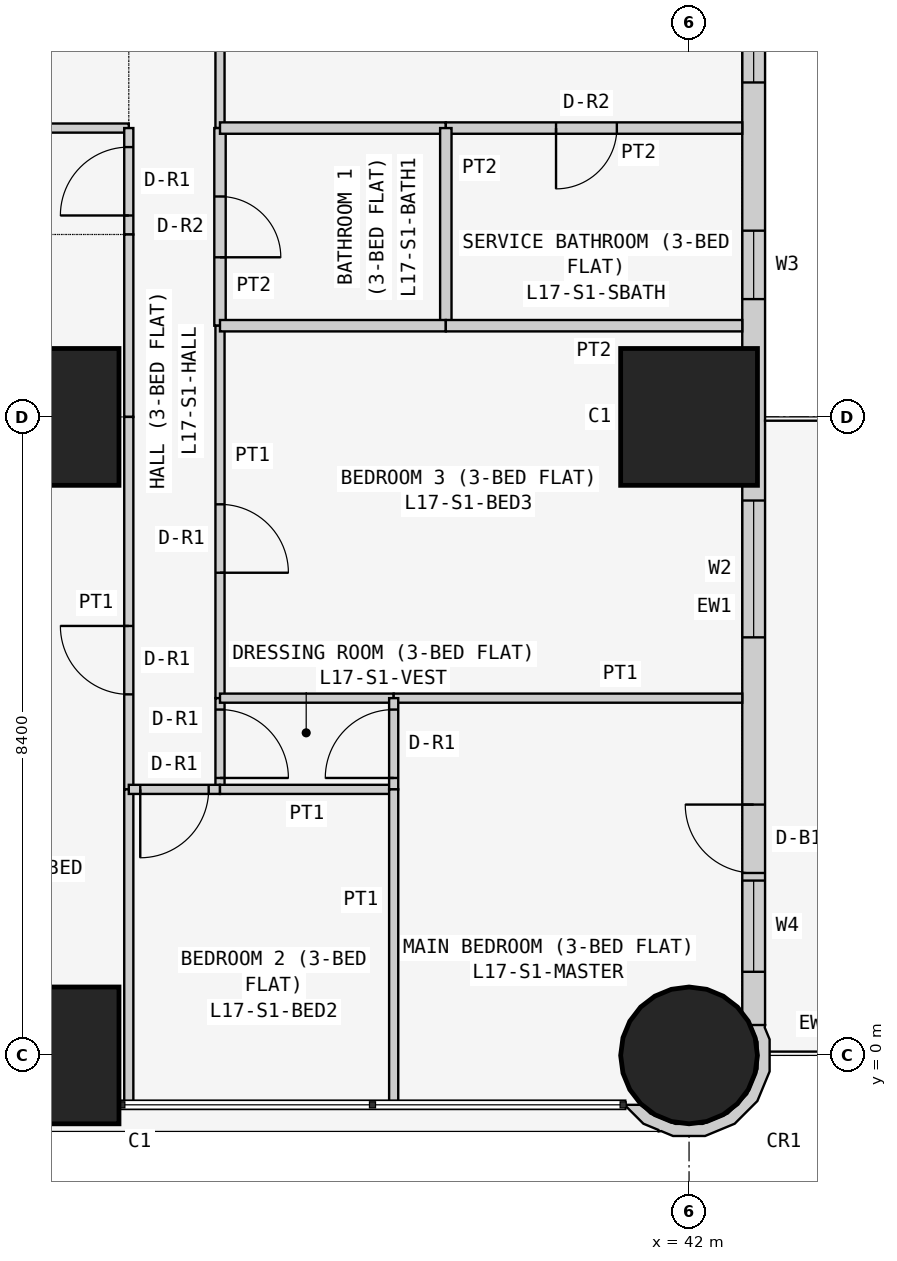
"""IFC4 building model, lengths in metres.
Left out: names, types, materials, properties, quantities, classifications, styles, units other than length and angle.
Written with IfcOpenShell. Run it as: python <this file> out.ifc"""

import sys

from ifc_helpers import new_model, si_unit, direction, frame, frame_2d, origin, origin_2d, place, context, subcontext, project, spatial, polyline, rectangle, circle, outline, extrude, element, fill, save


model = new_model("IFC4")
c1 = context("Model", 3, precision=1e-05, world=origin(), true_north=direction((0.0, 1.0)))
c2 = subcontext(c1, "Body", "Model", "MODEL_VIEW")
j1 = project(units=[si_unit("LENGTHUNIT", "METRE"), si_unit("PLANEANGLEUNIT", "RADIAN")], contexts=[c1])
p1 = place(None, origin())
s1 = spatial("IfcSite", under=j1, at=p1, CompositionType="ELEMENT")
p2 = place(p1, origin())
s2 = spatial("IfcBuilding", under=s1, at=p2, CompositionType="ELEMENT")
p3 = place(p2, frame((0.0, 0.0, 70.5)))
s3 = spatial("IfcBuildingStorey", under=s2, at=p3, CompositionType="ELEMENT", Elevation=70.5)
for number, where, z_axis, x_axis in (
    (1, (33.6, 0.0, 0.0), (0.0, 0.0, 1.0), (1.0, 0.0, 0.0)),
    (2, (33.6, 8.4, 0.0), (0.0, 0.0, 1.0), (1.0, 0.0, 0.0)),
):
    element("IfcColumn", number, at=place(p3, frame(where, z_axis=z_axis, x_axis=x_axis)), inside=s3, PredefinedType="COLUMN", context=c2, shape_type="SweptSolid", body=[
        extrude(rectangle(XDim=1.8, YDim=1.8, at=origin_2d()), origin(), (0.0, 0.0, 1.0), 3.6),
    ])
p4 = place(p3, frame((42.0, 0.0, 0.0), z_axis=(0.0, 0.0, 1.0), x_axis=(1.0, 0.0, 0.0)))
e3 = element("IfcColumn", 3, at=p4, inside=s3, PredefinedType="COLUMN", context=c2, shape_type="SweptSolid", body=[
    extrude(circle(Radius=0.9, at=origin_2d()), origin(), (0.0, 0.0, 1.0), 3.6),
])
p5 = place(p3, frame((42.0, 8.4, 0.0), z_axis=(0.0, 0.0, 1.0), x_axis=(1.0, 0.0, 0.0)))
e4 = element("IfcColumn", 4, at=p5, inside=s3, PredefinedType="COLUMN", context=c2, shape_type="SweptSolid", body=[
    extrude(rectangle(XDim=1.8, YDim=1.8, at=origin_2d()), origin(), (0.0, 0.0, 1.0), 3.6),
])
p6 = place(p3, frame((42.85, 0.4, 0.0), z_axis=(0.0, 0.0, 1.0), x_axis=(0.0, 1.0, 0.0)))
e5 = element("IfcWall", 5, at=p6, inside=s3, PredefinedType="SOLIDWALL", context=c2, shape_type="SweptSolid", body=[
    extrude(rectangle(XDim=15.7, YDim=0.3, at=frame_2d((7.85, 0.0))), origin(), (0.0, 0.0, 1.0), 3.45),
])
p7 = place(p6, frame((12.4, 0.0, 0.9)))
e6 = element("IfcOpeningElement", 6, at=p7, cuts=e5, PredefinedType="OPENING", context=c2, shape_type="SweptSolid", body=[
    extrude(rectangle(XDim=1.8, YDim=1.5, at=frame_2d((0.9, 0.75))), frame((0.0, 0.16, 0.0), z_axis=(0.0, -1.0, 0.0), x_axis=(1.0, 0.0, 0.0)), (0.0, 0.0, 1.0), 0.32),
])
p8 = place(p6, frame((9.55, 0.0, 1.5)))
e7 = element("IfcOpeningElement", 7, at=p8, cuts=e5, PredefinedType="OPENING", context=c2, shape_type="SweptSolid", body=[
    extrude(rectangle(XDim=0.9, YDim=0.7, at=frame_2d((0.45, 0.35))), frame((0.0, 0.16, 0.0), z_axis=(0.0, -1.0, 0.0), x_axis=(1.0, 0.0, 0.0)), (0.0, 0.0, 1.0), 0.32),
])
p9 = place(p6, frame((5.1, 0.0, 0.9)))
e8 = element("IfcOpeningElement", 8, at=p9, cuts=e5, PredefinedType="OPENING", context=c2, shape_type="SweptSolid", body=[
    extrude(rectangle(XDim=1.8, YDim=1.5, at=frame_2d((0.9, 0.75))), frame((0.0, 0.16, 0.0), z_axis=(0.0, -1.0, 0.0), x_axis=(1.0, 0.0, 0.0)), (0.0, 0.0, 1.0), 0.32),
])
p10 = place(p6, frame((2.0, 0.0, 0.0)))
e9 = element("IfcOpeningElement", 9, at=p10, cuts=e5, PredefinedType="OPENING", context=c2, shape_type="SweptSolid", body=[
    extrude(rectangle(XDim=0.9, YDim=2.4, at=frame_2d((0.45, 1.2))), frame((0.0, 0.16, 0.0), z_axis=(0.0, -1.0, 0.0), x_axis=(1.0, 0.0, 0.0)), (0.0, 0.0, 1.0), 0.32),
])
p11 = place(p6, frame((0.7, 0.0, 0.9)))
e10 = element("IfcOpeningElement", 10, at=p11, cuts=e5, PredefinedType="OPENING", context=c2, shape_type="SweptSolid", body=[
    extrude(rectangle(XDim=1.2, YDim=1.5, at=frame_2d((0.6, 0.75))), frame((0.0, 0.16, 0.0), z_axis=(0.0, -1.0, 0.0), x_axis=(1.0, 0.0, 0.0)), (0.0, 0.0, 1.0), 0.32),
])
p12 = place(p3, frame((41.233, -0.611, 0.0), z_axis=(0.0, 0.0, 1.0), x_axis=(0.377204953059, -0.926129809145, 0.0)))
e11 = element("IfcWall", 11, at=p12, inside=s3, PredefinedType="SOLIDWALL", context=c2, shape_type="SweptSolid", body=[
    extrude(outline(polyline([(0.319, 1.843), (-0.072, 2.001), (-0.24, 2.001), (-0.269, 2.017), (-0.37, 1.841), (-0.102, 1.842), (0.23, 1.707), (0.485, 1.455), (0.624, 1.125), (0.626, 0.766), (0.49, 0.434), (0.239, 0.179), (0.09, 0.117), (0.011, -0.078), (0.024, -0.083), (0.33, 0.045), (0.48, 0.197), (0.499, 0.193), (0.508, 0.225), (0.626, 0.345), (0.785, 0.736), (0.782, 1.157), (0.619, 1.546), (0.319, 1.843)])), origin(), (0.0, 0.0, 1.0), 3.45),
])
p13 = place(p3, frame((29.4, 12.2, 0.0), z_axis=(0.0, 0.0, 1.0), x_axis=(1.0, 0.0, 0.0)))
e12 = element("IfcWall", 12, at=p13, inside=s3, PredefinedType="PARTITIONING", context=c2, shape_type="SweptSolid", body=[
    extrude(rectangle(XDim=5.229, YDim=0.12, at=frame_2d((2.615, 0.0))), origin(), (0.0, 0.0, 1.0), 3.45),
])
p14 = place(p3, frame((34.629, 10.8, 0.0), z_axis=(0.0, 0.0, 1.0), x_axis=(0.0, 1.0, 0.0)))
e13 = element("IfcWall", 13, at=p14, inside=s3, PredefinedType="PARTITIONING", context=c2, shape_type="SweptSolid", body=[
    extrude(rectangle(XDim=1.4, YDim=0.12, at=frame_2d((0.7, 0.0))), origin(), (0.0, 0.0, 1.0), 3.45),
])
p15 = place(p14, frame((0.25, 0.0, 0.0)))
e14 = element("IfcOpeningElement", 14, at=p15, cuts=e13, PredefinedType="OPENING", context=c2, shape_type="SweptSolid", body=[
    extrude(rectangle(XDim=0.9, YDim=2.1, at=frame_2d((0.45, 1.05))), frame((0.0, 0.07, 0.0), z_axis=(0.0, -1.0, 0.0), x_axis=(1.0, 0.0, 0.0)), (0.0, 0.0, 1.0), 0.14),
])
p16 = place(p3, frame((34.629, 8.4, 0.0), z_axis=(0.0, 0.0, 1.0), x_axis=(0.0, 1.0, 0.0)))
e15 = element("IfcWall", 15, at=p16, inside=s3, PredefinedType="PARTITIONING", context=c2, shape_type="SweptSolid", body=[
    extrude(rectangle(XDim=2.4, YDim=0.12, at=frame_2d((1.2, 0.0))), origin(), (0.0, 0.0, 1.0), 3.45),
])
p17 = place(p3, frame((34.629, 3.5, 0.0), z_axis=(0.0, 0.0, 1.0), x_axis=(0.0, 1.0, 0.0)))
e16 = element("IfcWall", 16, at=p17, inside=s3, PredefinedType="PARTITIONING", context=c2, shape_type="SweptSolid", body=[
    extrude(rectangle(XDim=4.9, YDim=0.12, at=frame_2d((2.45, 0.0))), origin(), (0.0, 0.0, 1.0), 3.45),
])
p18 = place(p17, frame((1.25, 0.0, 0.0)))
e17 = element("IfcOpeningElement", 17, at=p18, cuts=e16, PredefinedType="OPENING", context=c2, shape_type="SweptSolid", body=[
    extrude(rectangle(XDim=0.9, YDim=2.1, at=frame_2d((0.45, 1.05))), frame((0.0, 0.07, 0.0), z_axis=(0.0, -1.0, 0.0), x_axis=(1.0, 0.0, 0.0)), (0.0, 0.0, 1.0), 0.14),
])
p19 = place(p3, frame((34.629, -0.65, 0.0), z_axis=(0.0, 0.0, 1.0), x_axis=(0.0, 1.0, 0.0)))
e18 = element("IfcWall", 18, at=p19, inside=s3, PredefinedType="PARTITIONING", context=c2, shape_type="SweptSolid", body=[
    extrude(rectangle(XDim=4.15, YDim=0.12, at=frame_2d((2.075, 0.0))), origin(), (0.0, 0.0, 1.0), 3.45),
])
p20 = place(p3, frame((35.829, 12.2, 0.0), z_axis=(0.0, 0.0, 1.0), x_axis=(0.0, 1.0, 0.0)))
e19 = element("IfcWall", 19, at=p20, inside=s3, PredefinedType="PARTITIONING", context=c2, shape_type="SweptSolid", body=[
    extrude(rectangle(XDim=3.575, YDim=0.12, at=frame_2d((1.788, 0.0))), origin(), (0.0, 0.0, 1.0), 3.45),
])
p21 = place(p20, frame((1.35, 0.0, 0.0)))
e20 = element("IfcOpeningElement", 20, at=p21, cuts=e19, PredefinedType="OPENING", context=c2, shape_type="SweptSolid", body=[
    extrude(rectangle(XDim=0.9, YDim=2.1, at=frame_2d((0.45, 1.05))), frame((0.0, 0.07, 0.0), z_axis=(0.0, -1.0, 0.0), x_axis=(1.0, 0.0, 0.0)), (0.0, 0.0, 1.0), 0.14),
])
p22 = place(p3, frame((35.829, 9.6, 0.0), z_axis=(0.0, 0.0, 1.0), x_axis=(0.0, 1.0, 0.0)))
e21 = element("IfcWall", 21, at=p22, inside=s3, PredefinedType="PARTITIONING", context=c2, shape_type="SweptSolid", body=[
    extrude(rectangle(XDim=2.6, YDim=0.15, at=frame_2d((1.3, 0.0))), origin(), (0.0, 0.0, 1.0), 3.45),
])
p23 = place(p22, frame((0.9, 0.0, 0.0)))
e22 = element("IfcOpeningElement", 22, at=p23, cuts=e21, PredefinedType="OPENING", context=c2, shape_type="SweptSolid", body=[
    extrude(rectangle(XDim=0.8, YDim=2.1, at=frame_2d((0.4, 1.05))), frame((0.0, 0.085, 0.0), z_axis=(0.0, -1.0, 0.0), x_axis=(1.0, 0.0, 0.0)), (0.0, 0.0, 1.0), 0.17),
])
p24 = place(p3, frame((35.829, 4.7, 0.0), z_axis=(0.0, 0.0, 1.0), x_axis=(0.0, 1.0, 0.0)))
e23 = element("IfcWall", 23, at=p24, inside=s3, PredefinedType="PARTITIONING", context=c2, shape_type="SweptSolid", body=[
    extrude(rectangle(XDim=4.9, YDim=0.12, at=frame_2d((2.45, 0.0))), origin(), (0.0, 0.0, 1.0), 3.45),
])
p25 = place(p24, frame((1.65, 0.0, 0.0)))
e24 = element("IfcOpeningElement", 24, at=p25, cuts=e23, PredefinedType="OPENING", context=c2, shape_type="SweptSolid", body=[
    extrude(rectangle(XDim=0.9, YDim=2.1, at=frame_2d((0.45, 1.05))), frame((0.0, 0.07, 0.0), z_axis=(0.0, -1.0, 0.0), x_axis=(1.0, 0.0, 0.0)), (0.0, 0.0, 1.0), 0.14),
])
p26 = place(p3, frame((35.829, 3.5, 0.0), z_axis=(0.0, 0.0, 1.0), x_axis=(0.0, 1.0, 0.0)))
e25 = element("IfcWall", 25, at=p26, inside=s3, PredefinedType="PARTITIONING", context=c2, shape_type="SweptSolid", body=[
    extrude(rectangle(XDim=1.2, YDim=0.12, at=frame_2d((0.6, 0.0))), origin(), (0.0, 0.0, 1.0), 3.45),
])
p27 = place(p26, frame((0.15, 0.0, 0.0)))
e26 = element("IfcOpeningElement", 26, at=p27, cuts=e25, PredefinedType="OPENING", context=c2, shape_type="SweptSolid", body=[
    extrude(rectangle(XDim=0.9, YDim=2.1, at=frame_2d((0.45, 1.05))), frame((0.0, 0.07, 0.0), z_axis=(0.0, -1.0, 0.0), x_axis=(1.0, 0.0, 0.0)), (0.0, 0.0, 1.0), 0.14),
])
p28 = place(p3, frame((34.629, 3.5, 0.0), z_axis=(0.0, 0.0, 1.0), x_axis=(1.0, 0.0, 0.0)))
e27 = element("IfcWall", 27, at=p28, inside=s3, PredefinedType="PARTITIONING", context=c2, shape_type="SweptSolid", body=[
    extrude(rectangle(XDim=1.2, YDim=0.12, at=frame_2d((0.6, 0.0))), origin(), (0.0, 0.0, 1.0), 3.45),
])
p29 = place(p28, frame((0.151, 0.0, 0.0)))
e28 = element("IfcOpeningElement", 28, at=p29, cuts=e27, PredefinedType="OPENING", context=c2, shape_type="SweptSolid", body=[
    extrude(rectangle(XDim=0.9, YDim=2.1, at=frame_2d((0.45, 1.05))), frame((0.0, 0.07, 0.0), z_axis=(0.0, -1.0, 0.0), x_axis=(1.0, 0.0, 0.0)), (0.0, 0.0, 1.0), 0.14),
])
p30 = place(p3, frame((35.829, 12.2, 0.0), z_axis=(0.0, 0.0, 1.0), x_axis=(1.0, 0.0, 0.0)))
e29 = element("IfcWall", 29, at=p30, inside=s3, PredefinedType="PARTITIONING", context=c2, shape_type="SweptSolid", body=[
    extrude(rectangle(XDim=2.971, YDim=0.15, at=frame_2d((1.485, 0.0))), origin(), (0.0, 0.0, 1.0), 3.45),
])
p31 = place(p3, frame((38.8, 12.2, 0.0), z_axis=(0.0, 0.0, 1.0), x_axis=(1.0, 0.0, 0.0)))
e30 = element("IfcWall", 30, at=p31, inside=s3, PredefinedType="PARTITIONING", context=c2, shape_type="SweptSolid", body=[
    extrude(rectangle(XDim=3.9, YDim=0.15, at=frame_2d((1.95, 0.0))), origin(), (0.0, 0.0, 1.0), 3.45),
])
p32 = place(p31, frame((1.45, 0.0, 0.0)))
e31 = element("IfcOpeningElement", 31, at=p32, cuts=e30, PredefinedType="OPENING", context=c2, shape_type="SweptSolid", body=[
    extrude(rectangle(XDim=0.8, YDim=2.1, at=frame_2d((0.4, 1.05))), frame((0.0, 0.085, 0.0), z_axis=(0.0, -1.0, 0.0), x_axis=(1.0, 0.0, 0.0)), (0.0, 0.0, 1.0), 0.17),
])
p33 = place(p3, frame((38.8, 9.6, 0.0), z_axis=(0.0, 0.0, 1.0), x_axis=(0.0, 1.0, 0.0)))
e32 = element("IfcWall", 32, at=p33, inside=s3, PredefinedType="PARTITIONING", context=c2, shape_type="SweptSolid", body=[
    extrude(rectangle(XDim=2.6, YDim=0.15, at=frame_2d((1.3, 0.0))), origin(), (0.0, 0.0, 1.0), 3.45),
])
p34 = place(p3, frame((35.829, 9.6, 0.0), z_axis=(0.0, 0.0, 1.0), x_axis=(1.0, 0.0, 0.0)))
e33 = element("IfcWall", 33, at=p34, inside=s3, PredefinedType="PARTITIONING", context=c2, shape_type="SweptSolid", body=[
    extrude(rectangle(XDim=2.971, YDim=0.15, at=frame_2d((1.485, 0.0))), origin(), (0.0, 0.0, 1.0), 3.45),
])
p35 = place(p3, frame((38.8, 9.6, 0.0), z_axis=(0.0, 0.0, 1.0), x_axis=(1.0, 0.0, 0.0)))
e34 = element("IfcWall", 34, at=p35, inside=s3, PredefinedType="PARTITIONING", context=c2, shape_type="SweptSolid", body=[
    extrude(rectangle(XDim=3.9, YDim=0.15, at=frame_2d((1.95, 0.0))), origin(), (0.0, 0.0, 1.0), 3.45),
])
p36 = place(p3, frame((35.829, 4.7, 0.0), z_axis=(0.0, 0.0, 1.0), x_axis=(1.0, 0.0, 0.0)))
e35 = element("IfcWall", 35, at=p36, inside=s3, PredefinedType="PARTITIONING", context=c2, shape_type="SweptSolid", body=[
    extrude(rectangle(XDim=2.285, YDim=0.12, at=frame_2d((1.143, 0.0))), origin(), (0.0, 0.0, 1.0), 3.45),
])
p37 = place(p3, frame((38.114, 4.7, 0.0), z_axis=(0.0, 0.0, 1.0), x_axis=(1.0, 0.0, 0.0)))
e36 = element("IfcWall", 36, at=p37, inside=s3, PredefinedType="PARTITIONING", context=c2, shape_type="SweptSolid", body=[
    extrude(rectangle(XDim=4.586, YDim=0.12, at=frame_2d((2.293, 0.0))), origin(), (0.0, 0.0, 1.0), 3.45),
])
p38 = place(p3, frame((35.829, 3.5, 0.0), z_axis=(0.0, 0.0, 1.0), x_axis=(1.0, 0.0, 0.0)))
e37 = element("IfcWall", 37, at=p38, inside=s3, PredefinedType="PARTITIONING", context=c2, shape_type="SweptSolid", body=[
    extrude(rectangle(XDim=2.285, YDim=0.12, at=frame_2d((1.143, 0.0))), origin(), (0.0, 0.0, 1.0), 3.45),
])
p39 = place(p3, frame((38.114, 3.5, 0.0), z_axis=(0.0, 0.0, 1.0), x_axis=(0.0, 1.0, 0.0)))
e38 = element("IfcWall", 38, at=p39, inside=s3, PredefinedType="PARTITIONING", context=c2, shape_type="SweptSolid", body=[
    extrude(rectangle(XDim=1.2, YDim=0.12, at=frame_2d((0.6, 0.0))), origin(), (0.0, 0.0, 1.0), 3.45),
])
p40 = place(p39, frame((0.15, 0.0, 0.0)))
e39 = element("IfcOpeningElement", 39, at=p40, cuts=e38, PredefinedType="OPENING", context=c2, shape_type="SweptSolid", body=[
    extrude(rectangle(XDim=0.9, YDim=2.1, at=frame_2d((0.45, 1.05))), frame((0.0, 0.07, 0.0), z_axis=(0.0, -1.0, 0.0), x_axis=(1.0, 0.0, 0.0)), (0.0, 0.0, 1.0), 0.14),
])
p41 = place(p3, frame((38.114, -0.65, 0.0), z_axis=(0.0, 0.0, 1.0), x_axis=(0.0, 1.0, 0.0)))
e40 = element("IfcWall", 40, at=p41, inside=s3, PredefinedType="PARTITIONING", context=c2, shape_type="SweptSolid", body=[
    extrude(rectangle(XDim=4.15, YDim=0.12, at=frame_2d((2.075, 0.0))), origin(), (0.0, 0.0, 1.0), 3.45),
])
p42 = place(p7, origin())
e41 = element("IfcWindow", 41, at=p42, inside=s3, PartitioningType="SINGLE_PANEL", PredefinedType="WINDOW", context=c2, shape_type="SweptSolid", body=[
    extrude(rectangle(XDim=1.8, YDim=1.5, at=frame_2d((0.9, 0.75))), frame((0.0, 0.03, 0.0), z_axis=(0.0, -1.0, 0.0), x_axis=(1.0, 0.0, 0.0)), (0.0, 0.0, 1.0), 0.06),
])
fill(e6, e41)
p43 = place(p8, origin())
e42 = element("IfcWindow", 42, at=p43, inside=s3, PartitioningType="SINGLE_PANEL", PredefinedType="WINDOW", context=c2, shape_type="SweptSolid", body=[
    extrude(rectangle(XDim=0.9, YDim=0.7, at=frame_2d((0.45, 0.35))), frame((0.0, 0.03, 0.0), z_axis=(0.0, -1.0, 0.0), x_axis=(1.0, 0.0, 0.0)), (0.0, 0.0, 1.0), 0.06),
])
fill(e7, e42)
p44 = place(p9, origin())
e43 = element("IfcWindow", 43, at=p44, inside=s3, PartitioningType="SINGLE_PANEL", PredefinedType="WINDOW", context=c2, shape_type="SweptSolid", body=[
    extrude(rectangle(XDim=1.8, YDim=1.5, at=frame_2d((0.9, 0.75))), frame((0.0, 0.03, 0.0), z_axis=(0.0, -1.0, 0.0), x_axis=(1.0, 0.0, 0.0)), (0.0, 0.0, 1.0), 0.06),
])
fill(e8, e43)
p45 = place(p10, origin())
e44 = element("IfcDoor", 44, at=p45, inside=s3, OperationType="SINGLE_SWING_RIGHT", PredefinedType="DOOR", context=c2, shape_type="SweptSolid", body=[
    extrude(rectangle(XDim=0.9, YDim=2.4, at=frame_2d((0.45, 1.2))), frame((0.0, 0.025, 0.0), z_axis=(0.0, -1.0, 0.0), x_axis=(1.0, 0.0, 0.0)), (0.0, 0.0, 1.0), 0.05),
])
fill(e9, e44)
p46 = place(p11, origin())
e45 = element("IfcWindow", 45, at=p46, inside=s3, PartitioningType="SINGLE_PANEL", PredefinedType="WINDOW", context=c2, shape_type="SweptSolid", body=[
    extrude(rectangle(XDim=1.2, YDim=1.5, at=frame_2d((0.6, 0.75))), frame((0.0, 0.03, 0.0), z_axis=(0.0, -1.0, 0.0), x_axis=(1.0, 0.0, 0.0)), (0.0, 0.0, 1.0), 0.06),
])
fill(e10, e45)
p47 = place(p15, origin())
e46 = element("IfcDoor", 46, at=p47, inside=s3, OperationType="SINGLE_SWING_LEFT", PredefinedType="DOOR", context=c2, shape_type="SweptSolid", body=[
    extrude(rectangle(XDim=0.9, YDim=2.1, at=frame_2d((0.45, 1.05))), frame((0.0, 0.025, 0.0), z_axis=(0.0, -1.0, 0.0), x_axis=(1.0, 0.0, 0.0)), (0.0, 0.0, 1.0), 0.05),
])
fill(e14, e46)
p48 = place(p18, origin())
e47 = element("IfcDoor", 47, at=p48, inside=s3, OperationType="SINGLE_SWING_RIGHT", PredefinedType="DOOR", context=c2, shape_type="SweptSolid", body=[
    extrude(rectangle(XDim=0.9, YDim=2.1, at=frame_2d((0.45, 1.05))), frame((0.0, 0.025, 0.0), z_axis=(0.0, -1.0, 0.0), x_axis=(1.0, 0.0, 0.0)), (0.0, 0.0, 1.0), 0.05),
])
fill(e17, e47)
p49 = place(p32, frame((0.8, 0.0, 0.0), z_axis=(0.0, 0.0, 1.0), x_axis=(-1.0, 0.0, 0.0)))
e48 = element("IfcDoor", 48, at=p49, inside=s3, OperationType="SINGLE_SWING_RIGHT", PredefinedType="DOOR", context=c2, shape_type="SweptSolid", body=[
    extrude(rectangle(XDim=0.8, YDim=2.1, at=frame_2d((0.4, 1.05))), frame((0.0, 0.025, 0.0), z_axis=(0.0, -1.0, 0.0), x_axis=(1.0, 0.0, 0.0)), (0.0, 0.0, 1.0), 0.05),
])
fill(e31, e48)
p50 = place(p23, frame((0.8, 0.0, 0.0), z_axis=(0.0, 0.0, 1.0), x_axis=(-1.0, 0.0, 0.0)))
e49 = element("IfcDoor", 49, at=p50, inside=s3, OperationType="SINGLE_SWING_RIGHT", PredefinedType="DOOR", context=c2, shape_type="SweptSolid", body=[
    extrude(rectangle(XDim=0.8, YDim=2.1, at=frame_2d((0.4, 1.05))), frame((0.0, 0.025, 0.0), z_axis=(0.0, -1.0, 0.0), x_axis=(1.0, 0.0, 0.0)), (0.0, 0.0, 1.0), 0.05),
])
fill(e22, e49)
p51 = place(p25, frame((0.9, 0.0, 0.0), z_axis=(0.0, 0.0, 1.0), x_axis=(-1.0, 0.0, 0.0)))
e50 = element("IfcDoor", 50, at=p51, inside=s3, OperationType="SINGLE_SWING_RIGHT", PredefinedType="DOOR", context=c2, shape_type="SweptSolid", body=[
    extrude(rectangle(XDim=0.9, YDim=2.1, at=frame_2d((0.45, 1.05))), frame((0.0, 0.025, 0.0), z_axis=(0.0, -1.0, 0.0), x_axis=(1.0, 0.0, 0.0)), (0.0, 0.0, 1.0), 0.05),
])
fill(e24, e50)
p52 = place(p27, frame((0.9, 0.0, 0.0), z_axis=(0.0, 0.0, 1.0), x_axis=(-1.0, 0.0, 0.0)))
e51 = element("IfcDoor", 51, at=p52, inside=s3, OperationType="SINGLE_SWING_RIGHT", PredefinedType="DOOR", context=c2, shape_type="SweptSolid", body=[
    extrude(rectangle(XDim=0.9, YDim=2.1, at=frame_2d((0.45, 1.05))), frame((0.0, 0.025, 0.0), z_axis=(0.0, -1.0, 0.0), x_axis=(1.0, 0.0, 0.0)), (0.0, 0.0, 1.0), 0.05),
])
fill(e26, e51)
p53 = place(p40, origin())
e52 = element("IfcDoor", 52, at=p53, inside=s3, OperationType="SINGLE_SWING_LEFT", PredefinedType="DOOR", context=c2, shape_type="SweptSolid", body=[
    extrude(rectangle(XDim=0.9, YDim=2.1, at=frame_2d((0.45, 1.05))), frame((0.0, 0.025, 0.0), z_axis=(0.0, -1.0, 0.0), x_axis=(1.0, 0.0, 0.0)), (0.0, 0.0, 1.0), 0.05),
])
fill(e39, e52)
p54 = place(p29, frame((0.9, 0.0, 0.0), z_axis=(0.0, 0.0, 1.0), x_axis=(-1.0, 0.0, 0.0)))
e53 = element("IfcDoor", 53, at=p54, inside=s3, OperationType="SINGLE_SWING_RIGHT", PredefinedType="DOOR", context=c2, shape_type="SweptSolid", body=[
    extrude(rectangle(XDim=0.9, YDim=2.1, at=frame_2d((0.45, 1.05))), frame((0.0, 0.025, 0.0), z_axis=(0.0, -1.0, 0.0), x_axis=(1.0, 0.0, 0.0)), (0.0, 0.0, 1.0), 0.05),
])
fill(e28, e53)
save(model, sys.argv[1])
